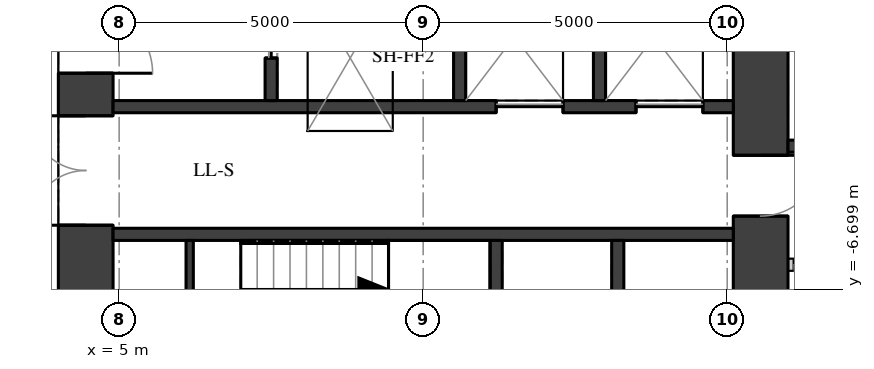
"""IFC4 building model, lengths in metres.
Left out: names, types, materials, properties, quantities, classifications, styles, units other than length and angle.
Written with IfcOpenShell. Run it as: python <this file> out.ifc"""

import sys

from ifc_helpers import new_model, si_unit, direction, frame, frame_2d, origin, place, context, subcontext, project, spatial, rectangle, extrude, element, fill, save


model = new_model("IFC4")
c1 = context("Model", 3, precision=1e-05, world=origin(), true_north=direction((0.0, 1.0)))
c2 = subcontext(c1, "Body", "Model", "MODEL_VIEW")
j1 = project(units=[si_unit("LENGTHUNIT", "METRE"), si_unit("PLANEANGLEUNIT", "RADIAN")], contexts=[c1])
p1 = place(None, origin())
s1 = spatial("IfcSite", under=j1, at=p1, CompositionType="ELEMENT")
p2 = place(p1, origin())
s2 = spatial("IfcBuilding", under=s1, at=p2, CompositionType="ELEMENT")
p3 = place(p2, frame((0.0, 0.0, 58.0)))
s3 = spatial("IfcBuildingStorey", under=s2, at=p3, CompositionType="ELEMENT", Elevation=58.0)
p4 = place(p3, frame((4.45, -11.1, 0.0), z_axis=(0.0, 0.0, 1.0), x_axis=(0.0, 1.0, 0.0)))
e1 = element("IfcWall", 1, at=p4, inside=s3, PredefinedType="SHEAR", context=c2, shape_type="SweptSolid", body=[
    extrude(rectangle(XDim=22.2, YDim=0.9, at=frame_2d((11.1, 0.0))), origin(), (0.0, 0.0, 1.0), 3.02),
])
p5 = place(p4, frame((2.35, 0.0, 0.0)))
e2 = element("IfcOpeningElement", 2, at=p5, cuts=e1, PredefinedType="OPENING", context=c2, shape_type="SweptSolid", body=[
    extrude(rectangle(XDim=1.5, YDim=2.1, at=frame_2d((0.75, 1.05))), frame((0.0, 0.46, 0.0), z_axis=(0.0, -1.0, 0.0), x_axis=(1.0, 0.0, 0.0)), (0.0, 0.0, 1.0), 0.92),
])
p6 = place(p4, frame((5.45, 0.0, 0.0)))
e3 = element("IfcOpeningElement", 3, at=p6, cuts=e1, PredefinedType="OPENING", context=c2, shape_type="SweptSolid", body=[
    extrude(rectangle(XDim=1.8, YDim=2.1, at=frame_2d((0.9, 1.05))), frame((0.0, 0.46, 0.0), z_axis=(0.0, -1.0, 0.0), x_axis=(1.0, 0.0, 0.0)), (0.0, 0.0, 1.0), 0.92),
])
p7 = place(p4, frame((7.95, 0.0, 0.0)))
e4 = element("IfcOpeningElement", 4, at=p7, cuts=e1, PredefinedType="OPENING", context=c2, shape_type="SweptSolid", body=[
    extrude(rectangle(XDim=1.1, YDim=2.1, at=frame_2d((0.55, 1.05))), frame((0.0, 0.46, 0.0), z_axis=(0.0, -1.0, 0.0), x_axis=(1.0, 0.0, 0.0)), (0.0, 0.0, 1.0), 0.92),
])
p8 = place(p4, frame((10.6, 0.0, 0.0)))
e5 = element("IfcOpeningElement", 5, at=p8, cuts=e1, PredefinedType="OPENING", context=c2, shape_type="SweptSolid", body=[
    extrude(rectangle(XDim=1.0, YDim=2.1, at=frame_2d((0.5, 1.05))), frame((0.0, 0.46, 0.0), z_axis=(0.0, -1.0, 0.0), x_axis=(1.0, 0.0, 0.0)), (0.0, 0.0, 1.0), 0.92),
])
p9 = place(p4, frame((13.15, 0.0, 0.0)))
e6 = element("IfcOpeningElement", 6, at=p9, cuts=e1, PredefinedType="OPENING", context=c2, shape_type="SweptSolid", body=[
    extrude(rectangle(XDim=1.1, YDim=2.1, at=frame_2d((0.55, 1.05))), frame((0.0, 0.46, 0.0), z_axis=(0.0, -1.0, 0.0), x_axis=(1.0, 0.0, 0.0)), (0.0, 0.0, 1.0), 0.92),
])
p10 = place(p4, frame((14.95, 0.0, 0.0)))
e7 = element("IfcOpeningElement", 7, at=p10, cuts=e1, PredefinedType="OPENING", context=c2, shape_type="SweptSolid", body=[
    extrude(rectangle(XDim=1.8, YDim=2.1, at=frame_2d((0.9, 1.05))), frame((0.0, 0.46, 0.0), z_axis=(0.0, -1.0, 0.0), x_axis=(1.0, 0.0, 0.0)), (0.0, 0.0, 1.0), 0.92),
])
p11 = place(p4, frame((18.35, 0.0, 0.0)))
e8 = element("IfcOpeningElement", 8, at=p11, cuts=e1, PredefinedType="OPENING", context=c2, shape_type="SweptSolid", body=[
    extrude(rectangle(XDim=1.5, YDim=2.1, at=frame_2d((0.75, 1.05))), frame((0.0, 0.46, 0.0), z_axis=(0.0, -1.0, 0.0), x_axis=(1.0, 0.0, 0.0)), (0.0, 0.0, 1.0), 0.92),
])
p12 = place(p3, frame((15.55, -11.1, 0.0), z_axis=(0.0, 0.0, 1.0), x_axis=(0.0, 1.0, 0.0)))
e9 = element("IfcWall", 9, at=p12, inside=s3, PredefinedType="SHEAR", context=c2, shape_type="SweptSolid", body=[
    extrude(rectangle(XDim=22.2, YDim=0.9, at=frame_2d((11.1, 0.0))), origin(), (0.0, 0.0, 1.0), 3.02),
])
p13 = place(p12, frame((15.6, 0.0, 0.0)))
e10 = element("IfcOpeningElement", 10, at=p13, cuts=e9, PredefinedType="OPENING", context=c2, shape_type="SweptSolid", body=[
    extrude(rectangle(XDim=1.0, YDim=2.1, at=frame_2d((0.5, 1.05))), frame((0.0, 0.46, 0.0), z_axis=(0.0, -1.0, 0.0), x_axis=(1.0, 0.0, 0.0)), (0.0, 0.0, 1.0), 0.92),
])
p14 = place(p12, frame((5.6, 0.0, 0.0)))
e11 = element("IfcOpeningElement", 11, at=p14, cuts=e9, PredefinedType="OPENING", context=c2, shape_type="SweptSolid", body=[
    extrude(rectangle(XDim=1.0, YDim=2.1, at=frame_2d((0.5, 1.05))), frame((0.0, 0.46, 0.0), z_axis=(0.0, -1.0, 0.0), x_axis=(1.0, 0.0, 0.0)), (0.0, 0.0, 1.0), 0.92),
])
p15 = place(p3, frame((4.9, -3.7, 0.0), z_axis=(0.0, 0.0, 1.0), x_axis=(1.0, 0.0, 0.0)))
e12 = element("IfcWall", 12, at=p15, inside=s3, PredefinedType="SHEAR", context=c2, shape_type="SweptSolid", body=[
    extrude(rectangle(XDim=10.2, YDim=0.2, at=frame_2d((5.1, 0.0))), origin(), (0.0, 0.0, 1.0), 3.02),
])
p16 = place(p15, frame((6.3, 0.0, 0.0)))
e13 = element("IfcOpeningElement", 13, at=p16, cuts=e12, PredefinedType="OPENING", context=c2, shape_type="SweptSolid", body=[
    extrude(rectangle(XDim=1.1, YDim=2.1, at=frame_2d((0.55, 1.05))), frame((0.0, 0.11, 0.0), z_axis=(0.0, -1.0, 0.0), x_axis=(1.0, 0.0, 0.0)), (0.0, 0.0, 1.0), 0.22),
])
p17 = place(p15, frame((8.6, 0.0, 0.0)))
e14 = element("IfcOpeningElement", 14, at=p17, cuts=e12, PredefinedType="OPENING", context=c2, shape_type="SweptSolid", body=[
    extrude(rectangle(XDim=1.1, YDim=2.1, at=frame_2d((0.55, 1.05))), frame((0.0, 0.11, 0.0), z_axis=(0.0, -1.0, 0.0), x_axis=(1.0, 0.0, 0.0)), (0.0, 0.0, 1.0), 0.22),
])
p18 = place(p3, frame((4.9, -5.8, 0.0), z_axis=(0.0, 0.0, 1.0), x_axis=(1.0, 0.0, 0.0)))
e15 = element("IfcWall", 15, at=p18, inside=s3, PredefinedType="SHEAR", context=c2, shape_type="SweptSolid", body=[
    extrude(rectangle(XDim=10.2, YDim=0.2, at=frame_2d((5.1, 0.0))), origin(), (0.0, 0.0, 1.0), 3.02),
])
for number, where, z_axis, x_axis in (
    (16, (11.2, -9.1, 0.0), (0.0, 0.0, 1.0), (0.0, 1.0, 0.0)),
    (17, (13.2, -9.1, 0.0), (0.0, 0.0, 1.0), (0.0, 1.0, 0.0)),
):
    element("IfcWall", number, at=place(p3, frame(where, z_axis=z_axis, x_axis=x_axis)), inside=s3, PredefinedType="SHEAR", context=c2, shape_type="SweptSolid", body=[
        extrude(rectangle(XDim=3.2, YDim=0.2, at=frame_2d((1.6, 0.0))), origin(), (0.0, 0.0, 1.0), 3.02),
    ])
p19 = place(p3, frame((7.5, -3.6, 0.0), z_axis=(0.0, 0.0, 1.0), x_axis=(0.0, 1.0, 0.0)))
e18 = element("IfcWall", 18, at=p19, inside=s3, PredefinedType="SHEAR", context=c2, shape_type="SweptSolid", body=[
    extrude(rectangle(XDim=2.5, YDim=0.2, at=frame_2d((1.25, 0.0))), origin(), (0.0, 0.0, 1.0), 3.02),
])
p20 = place(p19, frame((0.7, 0.0, 0.0)))
e19 = element("IfcOpeningElement", 19, at=p20, cuts=e18, PredefinedType="OPENING", context=c2, shape_type="SweptSolid", body=[
    extrude(rectangle(XDim=1.1, YDim=2.1, at=frame_2d((0.55, 1.05))), frame((0.0, 0.11, 0.0), z_axis=(0.0, -1.0, 0.0), x_axis=(1.0, 0.0, 0.0)), (0.0, 0.0, 1.0), 0.22),
])
for number, where, z_axis, x_axis in (
    (20, (10.6, -3.6, 0.0), (0.0, 0.0, 1.0), (0.0, 1.0, 0.0)),
    (21, (12.9, -3.6, 0.0), (0.0, 0.0, 1.0), (0.0, 1.0, 0.0)),
):
    element("IfcWall", number, at=place(p3, frame(where, z_axis=z_axis, x_axis=x_axis)), inside=s3, PredefinedType="SHEAR", context=c2, shape_type="SweptSolid", body=[
        extrude(rectangle(XDim=2.5, YDim=0.2, at=frame_2d((1.25, 0.0))), origin(), (0.0, 0.0, 1.0), 3.02),
    ])
p21 = place(p3, frame((6.16, -9.1, 0.0), z_axis=(0.0, 0.0, 1.0), x_axis=(0.0, 1.0, 0.0)))
e22 = element("IfcWall", 22, at=p21, inside=s3, PredefinedType="SHEAR", context=c2, shape_type="SweptSolid", body=[
    extrude(rectangle(XDim=3.2, YDim=0.12, at=frame_2d((1.6, 0.0))), origin(), (0.0, 0.0, 1.0), 3.02),
])
p22 = place(p21, frame((0.85, 0.0, 0.0)))
e23 = element("IfcOpeningElement", 23, at=p22, cuts=e22, PredefinedType="OPENING", context=c2, shape_type="SweptSolid", body=[
    extrude(rectangle(XDim=1.5, YDim=2.1, at=frame_2d((0.75, 1.05))), frame((0.0, 0.07, 0.0), z_axis=(0.0, -1.0, 0.0), x_axis=(1.0, 0.0, 0.0)), (0.0, 0.0, 1.0), 0.14),
])
p23 = place(p3, frame((16.0, -4.35, 0.0), z_axis=(0.0, 0.0, 1.0), x_axis=(1.0, 0.0, 0.0)))
e24 = element("IfcWall", 24, at=p23, inside=s3, PredefinedType="SHEAR", context=c2, shape_type="SweptSolid", body=[
    extrude(rectangle(XDim=2.3, YDim=0.2, at=frame_2d((1.15, 0.0))), origin(), (0.0, 0.0, 1.0), 3.02),
])
p24 = place(p3, frame((16.0, -6.3, 0.0), z_axis=(0.0, 0.0, 1.0), x_axis=(1.0, 0.0, 0.0)))
e25 = element("IfcWall", 25, at=p24, inside=s3, PredefinedType="PARTITIONING", context=c2, shape_type="SweptSolid", body=[
    extrude(rectangle(XDim=2.3, YDim=0.2, at=frame_2d((1.15, 0.0))), origin(), (0.0, 0.0, 1.0), 3.02),
])
p25 = place(p24, frame((0.1, 0.0, 0.0)))
e26 = element("IfcOpeningElement", 26, at=p25, cuts=e25, PredefinedType="OPENING", context=c2, shape_type="SweptSolid", body=[
    extrude(rectangle(XDim=0.9, YDim=2.1, at=frame_2d((0.45, 1.05))), frame((0.0, 0.11, 0.0), z_axis=(0.0, -1.0, 0.0), x_axis=(1.0, 0.0, 0.0)), (0.0, 0.0, 1.0), 0.22),
])
p26 = place(p6, origin())
e27 = element("IfcDoor", 27, at=p26, inside=s3, OperationType="DOUBLE_DOOR_SINGLE_SWING", PredefinedType="DOOR", context=c2, shape_type="SweptSolid", body=[
    extrude(rectangle(XDim=1.8, YDim=2.1, at=frame_2d((0.9, 1.05))), frame((0.0, 0.025, 0.0), z_axis=(0.0, -1.0, 0.0), x_axis=(1.0, 0.0, 0.0)), (0.0, 0.0, 1.0), 0.05),
])
fill(e3, e27)
p27 = place(p7, origin())
e28 = element("IfcDoor", 28, at=p27, inside=s3, OperationType="SINGLE_SWING_RIGHT", PredefinedType="DOOR", context=c2, shape_type="SweptSolid", body=[
    extrude(rectangle(XDim=1.1, YDim=2.1, at=frame_2d((0.55, 1.05))), frame((0.0, 0.025, 0.0), z_axis=(0.0, -1.0, 0.0), x_axis=(1.0, 0.0, 0.0)), (0.0, 0.0, 1.0), 0.05),
])
fill(e4, e28)
p28 = place(p16, origin())
e29 = element("IfcDoor", 29, at=p28, inside=s3, OperationType="DOUBLE_DOOR_SLIDING", PredefinedType="DOOR", context=c2, shape_type="SweptSolid", body=[
    extrude(rectangle(XDim=1.1, YDim=2.1, at=frame_2d((0.55, 1.05))), frame((0.0, 0.025, 0.0), z_axis=(0.0, -1.0, 0.0), x_axis=(1.0, 0.0, 0.0)), (0.0, 0.0, 1.0), 0.05),
])
fill(e13, e29)
p29 = place(p17, origin())
e30 = element("IfcDoor", 30, at=p29, inside=s3, OperationType="DOUBLE_DOOR_SLIDING", PredefinedType="DOOR", context=c2, shape_type="SweptSolid", body=[
    extrude(rectangle(XDim=1.1, YDim=2.1, at=frame_2d((0.55, 1.05))), frame((0.0, 0.025, 0.0), z_axis=(0.0, -1.0, 0.0), x_axis=(1.0, 0.0, 0.0)), (0.0, 0.0, 1.0), 0.05),
])
fill(e14, e30)
p30 = place(p20, origin())
e31 = element("IfcDoor", 31, at=p30, inside=s3, OperationType="DOUBLE_DOOR_SLIDING", PredefinedType="DOOR", context=c2, shape_type="SweptSolid", body=[
    extrude(rectangle(XDim=1.1, YDim=2.1, at=frame_2d((0.55, 1.05))), frame((0.0, 0.025, 0.0), z_axis=(0.0, -1.0, 0.0), x_axis=(1.0, 0.0, 0.0)), (0.0, 0.0, 1.0), 0.05),
])
fill(e19, e31)
p31 = place(p14, origin())
e32 = element("IfcDoor", 32, at=p31, inside=s3, OperationType="SINGLE_SWING_LEFT", PredefinedType="DOOR", context=c2, shape_type="SweptSolid", body=[
    extrude(rectangle(XDim=1.0, YDim=2.1, at=frame_2d((0.5, 1.05))), frame((0.0, 0.025, 0.0), z_axis=(0.0, -1.0, 0.0), x_axis=(1.0, 0.0, 0.0)), (0.0, 0.0, 1.0), 0.05),
])
fill(e11, e32)
save(model, sys.argv[1])
